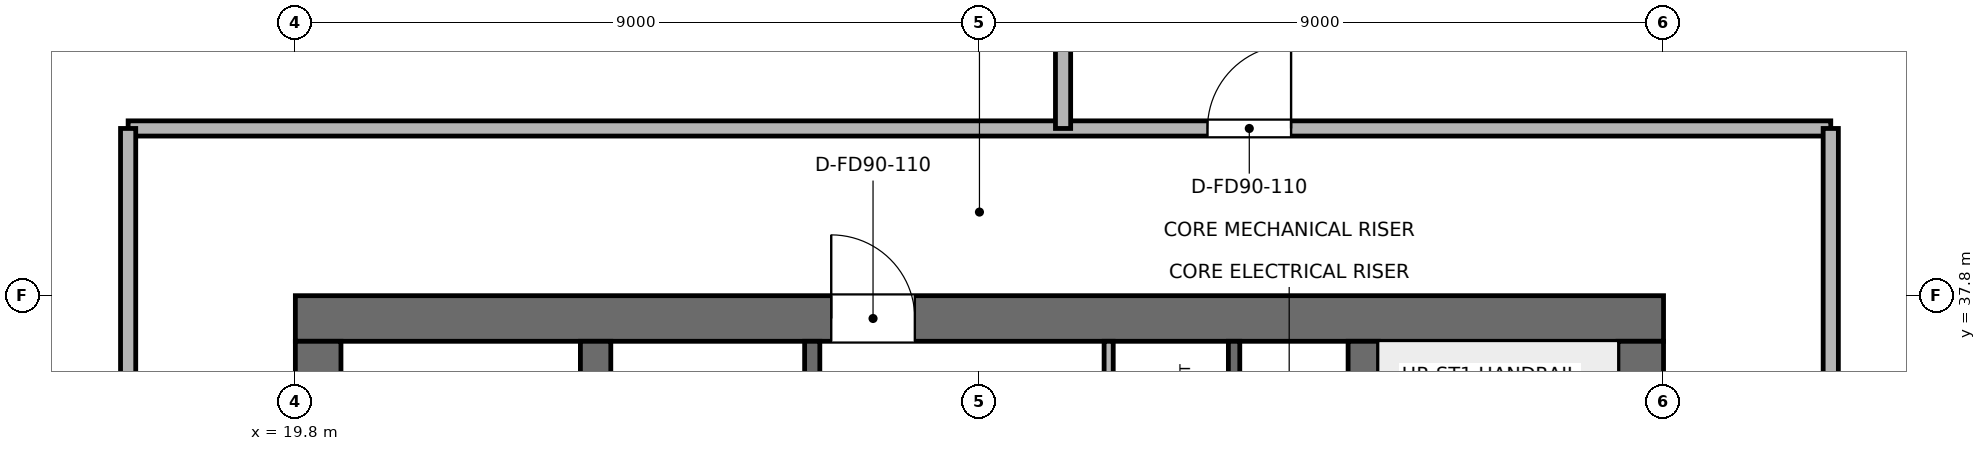
"""IFC4 building model, lengths in metres.
Left out: names, types, materials, properties, quantities, classifications, styles, units other than length and angle.
Written with IfcOpenShell. Run it as: python <this file> out.ifc"""

import sys

from ifc_helpers import new_model, si_unit, direction, frame, frame_2d, origin, place, context, subcontext, project, spatial, rectangle, extrude, element, fill, save


model = new_model("IFC4")
c1 = context("Model", 3, precision=1e-05, world=origin(), true_north=direction((0.0, 1.0)))
c2 = subcontext(c1, "Body", "Model", "MODEL_VIEW")
j1 = project(units=[si_unit("LENGTHUNIT", "METRE"), si_unit("PLANEANGLEUNIT", "RADIAN")], contexts=[c1])
p1 = place(None, origin())
s1 = spatial("IfcSite", under=j1, at=p1, CompositionType="ELEMENT")
p2 = place(p1, origin())
s2 = spatial("IfcBuilding", under=s1, at=p2, CompositionType="ELEMENT")
p3 = place(p2, frame((0.0, 0.0, 289.5)))
s3 = spatial("IfcBuildingStorey", under=s2, at=p3, CompositionType="ELEMENT", Elevation=289.5)
p4 = place(p3, frame((19.8, 37.5, 0.0), z_axis=(0.0, 0.0, 1.0), x_axis=(1.0, 0.0, 0.0)))
e1 = element("IfcWall", 1, at=p4, inside=s3, PredefinedType="SHEAR", context=c2, shape_type="SweptSolid", body=[
    extrude(rectangle(XDim=18.0, YDim=0.6, at=frame_2d((9.0, 0.0))), origin(), (0.0, 0.0, 1.0), 6.0),
])
p5 = place(p4, frame((7.05, 0.0, 0.0)))
e2 = element("IfcOpeningElement", 2, at=p5, cuts=e1, PredefinedType="OPENING", context=c2, shape_type="SweptSolid", body=[
    extrude(rectangle(XDim=1.1, YDim=2.15, at=frame_2d((0.55, 1.075))), frame((0.0, 0.31, 0.0), z_axis=(0.0, -1.0, 0.0), x_axis=(1.0, 0.0, 0.0)), (0.0, 0.0, 1.0), 0.62),
])
p6 = place(p3, frame((20.1, 20.4, 0.0), z_axis=(0.0, 0.0, 1.0), x_axis=(0.0, 1.0, 0.0)))
e3 = element("IfcWall", 3, at=p6, inside=s3, PredefinedType="SHEAR", context=c2, shape_type="SweptSolid", body=[
    extrude(rectangle(XDim=16.8, YDim=0.6, at=frame_2d((8.4, 0.0))), origin(), (0.0, 0.0, 1.0), 6.0),
])
p7 = place(p6, frame((10.4, 0.0, 0.0)))
e4 = element("IfcOpeningElement", 4, at=p7, cuts=e3, PredefinedType="OPENING", context=c2, shape_type="SweptSolid", body=[
    extrude(rectangle(XDim=1.1, YDim=2.15, at=frame_2d((0.55, 1.075))), frame((0.0, 0.31, 0.0), z_axis=(0.0, -1.0, 0.0), x_axis=(1.0, 0.0, 0.0)), (0.0, 0.0, 1.0), 0.62),
])
p8 = place(p3, frame((37.5, 20.4, 0.0), z_axis=(0.0, 0.0, 1.0), x_axis=(0.0, 1.0, 0.0)))
e5 = element("IfcWall", 5, at=p8, inside=s3, PredefinedType="SHEAR", context=c2, shape_type="SweptSolid", body=[
    extrude(rectangle(XDim=16.8, YDim=0.6, at=frame_2d((8.4, 0.0))), origin(), (0.0, 0.0, 1.0), 6.0),
])
p9 = place(p8, frame((4.9, 0.0, 0.0)))
e6 = element("IfcOpeningElement", 6, at=p9, cuts=e5, PredefinedType="OPENING", context=c2, shape_type="SweptSolid", body=[
    extrude(rectangle(XDim=1.1, YDim=2.15, at=frame_2d((0.55, 1.075))), frame((0.0, 0.31, 0.0), z_axis=(0.0, -1.0, 0.0), x_axis=(1.0, 0.0, 0.0)), (0.0, 0.0, 1.0), 0.62),
])
for number, where, z_axis, x_axis in (
    (7, (23.75, 20.4, 0.0), (0.0, 0.0, 1.0), (0.0, 1.0, 0.0)),
    (8, (33.85, 20.4, 0.0), (0.0, 0.0, 1.0), (0.0, 1.0, 0.0)),
):
    element("IfcWall", number, at=place(p3, frame(where, z_axis=z_axis, x_axis=x_axis)), inside=s3, PredefinedType="SHEAR", context=c2, shape_type="SweptSolid", body=[
        extrude(rectangle(XDim=16.8, YDim=0.4, at=frame_2d((8.4, 0.0))), origin(), (0.0, 0.0, 1.0), 6.0),
    ])
p10 = place(p3, frame((32.15, 34.0, 0.0), z_axis=(0.0, 0.0, 1.0), x_axis=(0.0, 1.0, 0.0)))
e9 = element("IfcWall", 9, at=p10, inside=s3, PredefinedType="SHEAR", context=c2, shape_type="SweptSolid", body=[
    extrude(rectangle(XDim=3.2, YDim=0.15, at=frame_2d((1.6, 0.0))), origin(), (0.0, 0.0, 1.0), 5.76),
])
p11 = place(p3, frame((26.6, 34.0, 0.0), z_axis=(0.0, 0.0, 1.0), x_axis=(0.0, 1.0, 0.0)))
e10 = element("IfcWall", 10, at=p11, inside=s3, PredefinedType="SHEAR", context=c2, shape_type="SweptSolid", body=[
    extrude(rectangle(XDim=3.2, YDim=0.2, at=frame_2d((1.6, 0.0))), origin(), (0.0, 0.0, 1.0), 5.76),
])
p12 = place(p11, frame((0.75, 0.0, 0.0)))
e11 = element("IfcOpeningElement", 11, at=p12, cuts=e10, PredefinedType="OPENING", context=c2, shape_type="SweptSolid", body=[
    extrude(rectangle(XDim=1.1, YDim=2.15, at=frame_2d((0.55, 1.075))), frame((0.0, 0.11, 0.0), z_axis=(0.0, -1.0, 0.0), x_axis=(1.0, 0.0, 0.0)), (0.0, 0.0, 1.0), 0.22),
])
p13 = place(p3, frame((30.5, 33.925, 0.0), z_axis=(0.0, 0.0, 1.0), x_axis=(0.0, 1.0, 0.0)))
e12 = element("IfcWall", 12, at=p13, inside=s3, PredefinedType="PARTITIONING", context=c2, shape_type="SweptSolid", body=[
    extrude(rectangle(XDim=3.275, YDim=0.12, at=frame_2d((1.637, 0.0))), origin(), (0.0, 0.0, 1.0), 5.76),
])
p14 = place(p13, frame((0.85, 0.0, 0.0)))
e13 = element("IfcOpeningElement", 13, at=p14, cuts=e12, PredefinedType="OPENING", context=c2, shape_type="SweptSolid", body=[
    extrude(rectangle(XDim=0.9, YDim=2.1, at=frame_2d((0.45, 1.05))), frame((0.0, 0.07, 0.0), z_axis=(0.0, -1.0, 0.0), x_axis=(1.0, 0.0, 0.0)), (0.0, 0.0, 1.0), 0.14),
])
p15 = place(p3, frame((17.6, 40.0, 0.0), z_axis=(0.0, 0.0, 1.0), x_axis=(1.0, 0.0, 0.0)))
e14 = element("IfcWall", 14, at=p15, inside=s3, PredefinedType="PARTITIONING", context=c2, shape_type="SweptSolid", body=[
    extrude(rectangle(XDim=22.4, YDim=0.2, at=frame_2d((11.2, 0.0))), origin(), (0.0, 0.0, 1.0), 5.345),
])
p16 = place(p15, frame((14.2, 0.0, 0.0)))
e15 = element("IfcOpeningElement", 15, at=p16, cuts=e14, PredefinedType="OPENING", context=c2, shape_type="SweptSolid", body=[
    extrude(rectangle(XDim=1.1, YDim=2.15, at=frame_2d((0.55, 1.075))), frame((0.0, 0.11, 0.0), z_axis=(0.0, -1.0, 0.0), x_axis=(1.0, 0.0, 0.0)), (0.0, 0.0, 1.0), 0.22),
])
for number, where, z_axis, x_axis in (
    (16, (17.6, 17.6, 0.0), (0.0, 0.0, 1.0), (0.0, 1.0, 0.0)),
    (17, (40.0, 17.6, 0.0), (0.0, 0.0, 1.0), (0.0, 1.0, 0.0)),
):
    element("IfcWall", number, at=place(p3, frame(where, z_axis=z_axis, x_axis=x_axis)), inside=s3, PredefinedType="PARTITIONING", context=c2, shape_type="SweptSolid", body=[
        extrude(rectangle(XDim=22.4, YDim=0.2, at=frame_2d((11.2, 0.0))), origin(), (0.0, 0.0, 1.0), 5.345),
    ])
p17 = place(p3, frame((29.9, 40.0, 0.0), z_axis=(0.0, 0.0, 1.0), x_axis=(0.0, 1.0, 0.0)))
e18 = element("IfcWall", 18, at=p17, inside=s3, PredefinedType="PARTITIONING", context=c2, shape_type="SweptSolid", body=[
    extrude(rectangle(XDim=5.1, YDim=0.2, at=frame_2d((2.55, 0.0))), origin(), (0.0, 0.0, 1.0), 5.385),
])
p18 = place(p16, origin())
e19 = element("IfcDoor", 19, at=p18, inside=s3, OperationType="SINGLE_SWING_RIGHT", PredefinedType="DOOR", context=c2, shape_type="SweptSolid", body=[
    extrude(rectangle(XDim=1.1, YDim=2.15, at=frame_2d((0.55, 1.075))), frame((0.0, 0.025, 0.0), z_axis=(0.0, -1.0, 0.0), x_axis=(1.0, 0.0, 0.0)), (0.0, 0.0, 1.0), 0.05),
])
fill(e15, e19)
p19 = place(p5, origin())
e20 = element("IfcDoor", 20, at=p19, inside=s3, OperationType="SINGLE_SWING_LEFT", PredefinedType="DOOR", context=c2, shape_type="SweptSolid", body=[
    extrude(rectangle(XDim=1.1, YDim=2.15, at=frame_2d((0.55, 1.075))), frame((0.0, 0.025, 0.0), z_axis=(0.0, -1.0, 0.0), x_axis=(1.0, 0.0, 0.0)), (0.0, 0.0, 1.0), 0.05),
])
fill(e2, e20)
save(model, sys.argv[1])
